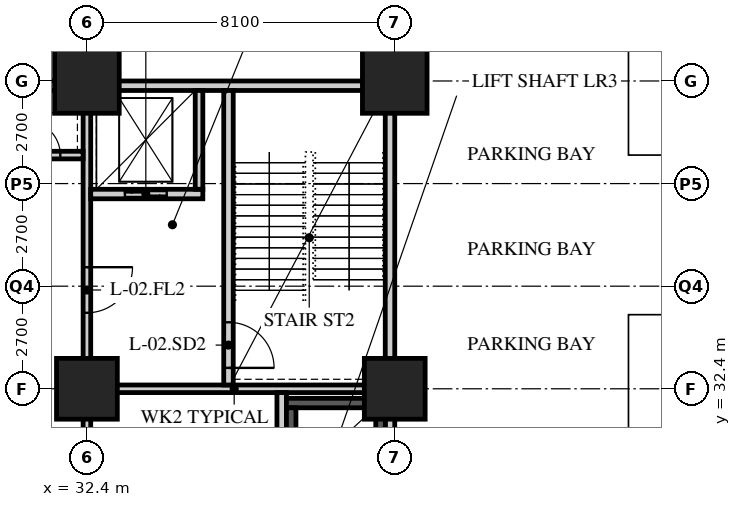
"""IFC4 building model, lengths in metres.
Left out: names, types, materials, properties, quantities, classifications, styles, units other than length and angle.
Written with IfcOpenShell. Run it as: python <this file> out.ifc"""

import sys

from ifc_helpers import new_model, si_unit, direction, frame, frame_2d, origin, origin_2d, place, context, subcontext, project, spatial, rectangle, hollow_rectangle, extrude, element, fill, save


model = new_model("IFC4")
c1 = context("Model", 3, precision=1e-05, world=origin(), true_north=direction((0.0, 1.0)))
c2 = subcontext(c1, "Body", "Model", "MODEL_VIEW")
j1 = project(units=[si_unit("LENGTHUNIT", "METRE"), si_unit("PLANEANGLEUNIT", "RADIAN")], contexts=[c1])
p1 = place(None, origin())
s1 = spatial("IfcSite", under=j1, at=p1, CompositionType="ELEMENT")
p2 = place(p1, origin())
s2 = spatial("IfcBuilding", under=s1, at=p2, CompositionType="ELEMENT")
p3 = place(p2, frame((0.0, 0.0, -8.4)))
s3 = spatial("IfcBuildingStorey", under=s2, at=p3, CompositionType="ELEMENT", Elevation=-8.4)
p4 = place(p3, frame((32.4, 32.4, 0.0), z_axis=(0.0, 0.0, 1.0), x_axis=(1.0, 0.0, 0.0)))
e1 = element("IfcColumn", 1, at=p4, inside=s3, PredefinedType="COLUMN", context=c2, shape_type="SweptSolid", body=[
    extrude(hollow_rectangle(XDim=1.6, YDim=1.6, WallThickness=0.15, at=origin_2d()), origin(), (0.0, 0.0, 1.0), 4.2),
])
p5 = place(p3, frame((32.4, 40.5, 0.0), z_axis=(0.0, 0.0, 1.0), x_axis=(1.0, 0.0, 0.0)))
e2 = element("IfcColumn", 2, at=p5, inside=s3, PredefinedType="COLUMN", context=c2, shape_type="SweptSolid", body=[
    extrude(hollow_rectangle(XDim=1.7, YDim=1.7, WallThickness=0.16, at=origin_2d()), origin(), (0.0, 0.0, 1.0), 4.2),
])
p6 = place(p3, frame((40.5, 32.4, 0.0), z_axis=(0.0, 0.0, 1.0), x_axis=(1.0, 0.0, 0.0)))
e3 = element("IfcColumn", 3, at=p6, inside=s3, PredefinedType="COLUMN", context=c2, shape_type="SweptSolid", body=[
    extrude(hollow_rectangle(XDim=1.6, YDim=1.6, WallThickness=0.15, at=origin_2d()), origin(), (0.0, 0.0, 1.0), 4.2),
])
p7 = place(p3, frame((40.5, 40.5, 0.0), z_axis=(0.0, 0.0, 1.0), x_axis=(1.0, 0.0, 0.0)))
e4 = element("IfcColumn", 4, at=p7, inside=s3, PredefinedType="COLUMN", context=c2, shape_type="SweptSolid", body=[
    extrude(hollow_rectangle(XDim=1.7, YDim=1.7, WallThickness=0.16, at=origin_2d()), origin(), (0.0, 0.0, 1.0), 4.2),
])
p8 = place(p3, frame((16.2, 40.375, 0.0), z_axis=(0.0, 0.0, 1.0), x_axis=(1.0, 0.0, 0.0)))
e5 = element("IfcWall", 5, at=p8, inside=s3, PredefinedType="SOLIDWALL", context=c2, shape_type="SweptSolid", body=[
    extrude(rectangle(XDim=24.3, YDim=0.25, at=frame_2d((12.15, 0.0))), origin(), (0.0, 0.0, 1.0), 2.95),
])
p9 = place(p8, frame((11.25, 0.0, 0.0)))
e6 = element("IfcOpeningElement", 6, at=p9, cuts=e5, PredefinedType="OPENING", context=c2, shape_type="SweptSolid", body=[
    extrude(rectangle(XDim=1.8, YDim=2.4, at=frame_2d((0.9, 1.2))), frame((0.0, 0.135, 0.0), z_axis=(0.0, -1.0, 0.0), x_axis=(1.0, 0.0, 0.0)), (0.0, 0.0, 1.0), 0.27),
])
p10 = place(p3, frame((40.375, 24.55, 0.0), z_axis=(0.0, 0.0, 1.0), x_axis=(0.0, 1.0, 0.0)))
e7 = element("IfcWall", 7, at=p10, inside=s3, PredefinedType="SOLIDWALL", context=c2, shape_type="SweptSolid", body=[
    extrude(rectangle(XDim=15.7, YDim=0.25, at=frame_2d((7.85, 0.0))), origin(), (0.0, 0.0, 1.0), 2.95),
])
p11 = place(p3, frame((32.3, 32.4, 0.0), z_axis=(0.0, 0.0, 1.0), x_axis=(1.0, 0.0, 0.0)))
e8 = element("IfcWall", 8, at=p11, inside=s3, PredefinedType="SOLIDWALL", context=c2, shape_type="SweptSolid", body=[
    extrude(rectangle(XDim=7.95, YDim=0.2, at=frame_2d((3.975, 0.0))), origin(), (0.0, 0.0, 1.0), 2.95),
])
p12 = place(p3, frame((32.4, 32.5, 0.0), z_axis=(0.0, 0.0, 1.0), x_axis=(0.0, 1.0, 0.0)))
e9 = element("IfcWall", 9, at=p12, inside=s3, PredefinedType="SOLIDWALL", context=c2, shape_type="SweptSolid", body=[
    extrude(rectangle(XDim=7.75, YDim=0.2, at=frame_2d((3.875, 0.0))), origin(), (0.0, 0.0, 1.0), 2.95),
])
p13 = place(p12, frame((1.9, 0.0, 0.0)))
e10 = element("IfcOpeningElement", 10, at=p13, cuts=e9, PredefinedType="OPENING", context=c2, shape_type="SweptSolid", body=[
    extrude(rectangle(XDim=1.2, YDim=2.1, at=frame_2d((0.6, 1.05))), frame((0.0, 0.11, 0.0), z_axis=(0.0, -1.0, 0.0), x_axis=(1.0, 0.0, 0.0)), (0.0, 0.0, 1.0), 0.22),
])
p14 = place(p3, frame((37.525, 24.55, 0.0), z_axis=(0.0, 0.0, 1.0), x_axis=(0.0, 1.0, 0.0)))
e11 = element("IfcWall", 11, at=p14, inside=s3, PredefinedType="SOLIDWALL", context=c2, shape_type="SweptSolid", body=[
    extrude(rectangle(XDim=7.75, YDim=0.25, at=frame_2d((3.875, 0.0))), origin(), (0.0, 0.0, 1.0), 3.95),
])
p15 = place(p3, frame((36.125, 32.5, 0.0), z_axis=(0.0, 0.0, 1.0), x_axis=(0.0, 1.0, 0.0)))
e12 = element("IfcWall", 12, at=p15, inside=s3, PredefinedType="SOLIDWALL", context=c2, shape_type="SweptSolid", body=[
    extrude(rectangle(XDim=7.75, YDim=0.25, at=frame_2d((3.875, 0.0))), origin(), (0.0, 0.0, 1.0), 3.95),
])
p16 = place(p15, frame((0.45, 0.0, 0.0)))
e13 = element("IfcOpeningElement", 13, at=p16, cuts=e12, PredefinedType="OPENING", context=c2, shape_type="SweptSolid", body=[
    extrude(rectangle(XDim=1.2, YDim=2.1, at=frame_2d((0.6, 1.05))), frame((0.0, 0.135, 0.0), z_axis=(0.0, -1.0, 0.0), x_axis=(1.0, 0.0, 0.0)), (0.0, 0.0, 1.0), 0.27),
])
p17 = place(p3, frame((32.5, 37.525, 0.0), z_axis=(0.0, 0.0, 1.0), x_axis=(1.0, 0.0, 0.0)))
e14 = element("IfcWall", 14, at=p17, inside=s3, PredefinedType="SOLIDWALL", context=c2, shape_type="SweptSolid", body=[
    extrude(rectangle(XDim=2.95, YDim=0.25, at=frame_2d((1.475, 0.0))), origin(), (0.0, 0.0, 1.0), 3.95),
])
p18 = place(p17, frame((0.9, 0.0, 0.0)))
e15 = element("IfcOpeningElement", 15, at=p18, cuts=e14, PredefinedType="OPENING", context=c2, shape_type="SweptSolid", body=[
    extrude(rectangle(XDim=1.1, YDim=2.4, at=frame_2d((0.55, 1.2))), frame((0.0, 0.135, 0.0), z_axis=(0.0, -1.0, 0.0), x_axis=(1.0, 0.0, 0.0)), (0.0, 0.0, 1.0), 0.27),
])
p19 = place(p3, frame((35.35, 37.65, 0.0), z_axis=(0.0, 0.0, 1.0), x_axis=(0.0, 1.0, 0.0)))
e16 = element("IfcWall", 16, at=p19, inside=s3, PredefinedType="SOLIDWALL", context=c2, shape_type="SweptSolid", body=[
    extrude(rectangle(XDim=2.6, YDim=0.2, at=frame_2d((1.3, 0.0))), origin(), (0.0, 0.0, 1.0), 3.95),
])
p20 = place(p3, frame((30.15, 38.55, 0.0), z_axis=(0.0, 0.0, 1.0), x_axis=(1.0, 0.0, 0.0)))
e17 = element("IfcWall", 17, at=p20, inside=s3, PredefinedType="SOLIDWALL", context=c2, shape_type="SweptSolid", body=[
    extrude(rectangle(XDim=2.15, YDim=0.2, at=frame_2d((1.075, 0.0))), origin(), (0.0, 0.0, 1.0), 3.95),
])
p21 = place(p20, frame((0.65, 0.0, 0.0)))
e18 = element("IfcOpeningElement", 18, at=p21, cuts=e17, PredefinedType="OPENING", context=c2, shape_type="SweptSolid", body=[
    extrude(rectangle(XDim=0.9, YDim=2.1, at=frame_2d((0.45, 1.05))), frame((0.0, 0.11, 0.0), z_axis=(0.0, -1.0, 0.0), x_axis=(1.0, 0.0, 0.0)), (0.0, 0.0, 1.0), 0.22),
])
p22 = place(p3, frame((32.4, 24.55, 0.0), z_axis=(0.0, 0.0, 1.0), x_axis=(0.0, 1.0, 0.0)))
e19 = element("IfcWall", 19, at=p22, inside=s3, PredefinedType="PARTITIONING", context=c2, shape_type="SweptSolid", body=[
    extrude(rectangle(XDim=7.75, YDim=0.2, at=frame_2d((3.875, 0.0))), origin(), (0.0, 0.0, 1.0), 2.95),
])
p23 = place(p22, frame((1.35, 0.0, 0.0)))
e20 = element("IfcOpeningElement", 20, at=p23, cuts=e19, PredefinedType="OPENING", context=c2, shape_type="SweptSolid", body=[
    extrude(rectangle(XDim=0.9, YDim=2.1, at=frame_2d((0.45, 1.05))), frame((0.0, 0.11, 0.0), z_axis=(0.0, -1.0, 0.0), x_axis=(1.0, 0.0, 0.0)), (0.0, 0.0, 1.0), 0.22),
])
p24 = place(p22, frame((5.3, 0.0, 0.0)))
e21 = element("IfcOpeningElement", 21, at=p24, cuts=e19, PredefinedType="OPENING", context=c2, shape_type="SweptSolid", body=[
    extrude(rectangle(XDim=0.9, YDim=2.1, at=frame_2d((0.45, 1.05))), frame((0.0, 0.11, 0.0), z_axis=(0.0, -1.0, 0.0), x_axis=(1.0, 0.0, 0.0)), (0.0, 0.0, 1.0), 0.22),
])
p25 = place(p3, frame((37.65, 32.025, -0.4), z_axis=(0.0, 0.0, 1.0), x_axis=(1.0, 0.0, 0.0)))
e22 = element("IfcWall", 22, at=p25, inside=s3, PredefinedType="SOLIDWALL", context=c2, shape_type="SweptSolid", body=[
    extrude(rectangle(XDim=2.6, YDim=0.25, at=frame_2d((1.3, 0.0))), origin(), (0.0, 0.0, 1.0), 4.6),
])
for number, where, z_axis, x_axis in (
    (23, (37.775, 30.0, -0.4), (0.0, 0.0, 1.0), (0.0, 1.0, 0.0)),
    (24, (40.125, 30.0, -0.4), (0.0, 0.0, 1.0), (0.0, 1.0, 0.0)),
):
    element("IfcWall", number, at=place(p3, frame(where, z_axis=z_axis, x_axis=x_axis)), inside=s3, PredefinedType="SOLIDWALL", context=c2, shape_type="SweptSolid", body=[
        extrude(rectangle(XDim=1.9, YDim=0.25, at=frame_2d((0.95, 0.0))), origin(), (0.0, 0.0, 1.0), 4.6),
    ])
p26 = place(p16, origin())
e25 = element("IfcDoor", 25, at=p26, inside=s3, OperationType="SINGLE_SWING_RIGHT", PredefinedType="DOOR", context=c2, shape_type="SweptSolid", body=[
    extrude(rectangle(XDim=1.2, YDim=2.1, at=frame_2d((0.6, 1.05))), frame((0.0, 0.025, 0.0), z_axis=(0.0, -1.0, 0.0), x_axis=(1.0, 0.0, 0.0)), (0.0, 0.0, 1.0), 0.05),
])
fill(e13, e25)
p27 = place(p13, origin())
e26 = element("IfcDoor", 26, at=p27, inside=s3, OperationType="SINGLE_SWING_LEFT", PredefinedType="DOOR", context=c2, shape_type="SweptSolid", body=[
    extrude(rectangle(XDim=1.2, YDim=2.1, at=frame_2d((0.6, 1.05))), frame((0.0, 0.025, 0.0), z_axis=(0.0, -1.0, 0.0), x_axis=(1.0, 0.0, 0.0)), (0.0, 0.0, 1.0), 0.05),
])
fill(e10, e26)
p28 = place(p21, origin())
e27 = element("IfcDoor", 27, at=p28, inside=s3, OperationType="SINGLE_SWING_LEFT", PredefinedType="DOOR", context=c2, shape_type="SweptSolid", body=[
    extrude(rectangle(XDim=0.9, YDim=2.1, at=frame_2d((0.45, 1.05))), frame((0.0, 0.025, 0.0), z_axis=(0.0, -1.0, 0.0), x_axis=(1.0, 0.0, 0.0)), (0.0, 0.0, 1.0), 0.05),
])
fill(e18, e27)
p29 = place(p18, origin())
e28 = element("IfcDoor", 28, at=p29, inside=s3, OperationType="DOUBLE_DOOR_SLIDING", PredefinedType="DOOR", context=c2, shape_type="SweptSolid", body=[
    extrude(rectangle(XDim=1.1, YDim=2.4, at=frame_2d((0.55, 1.2))), frame((0.0, 0.025, 0.0), z_axis=(0.0, -1.0, 0.0), x_axis=(1.0, 0.0, 0.0)), (0.0, 0.0, 1.0), 0.05),
])
fill(e15, e28)
save(model, sys.argv[1])
